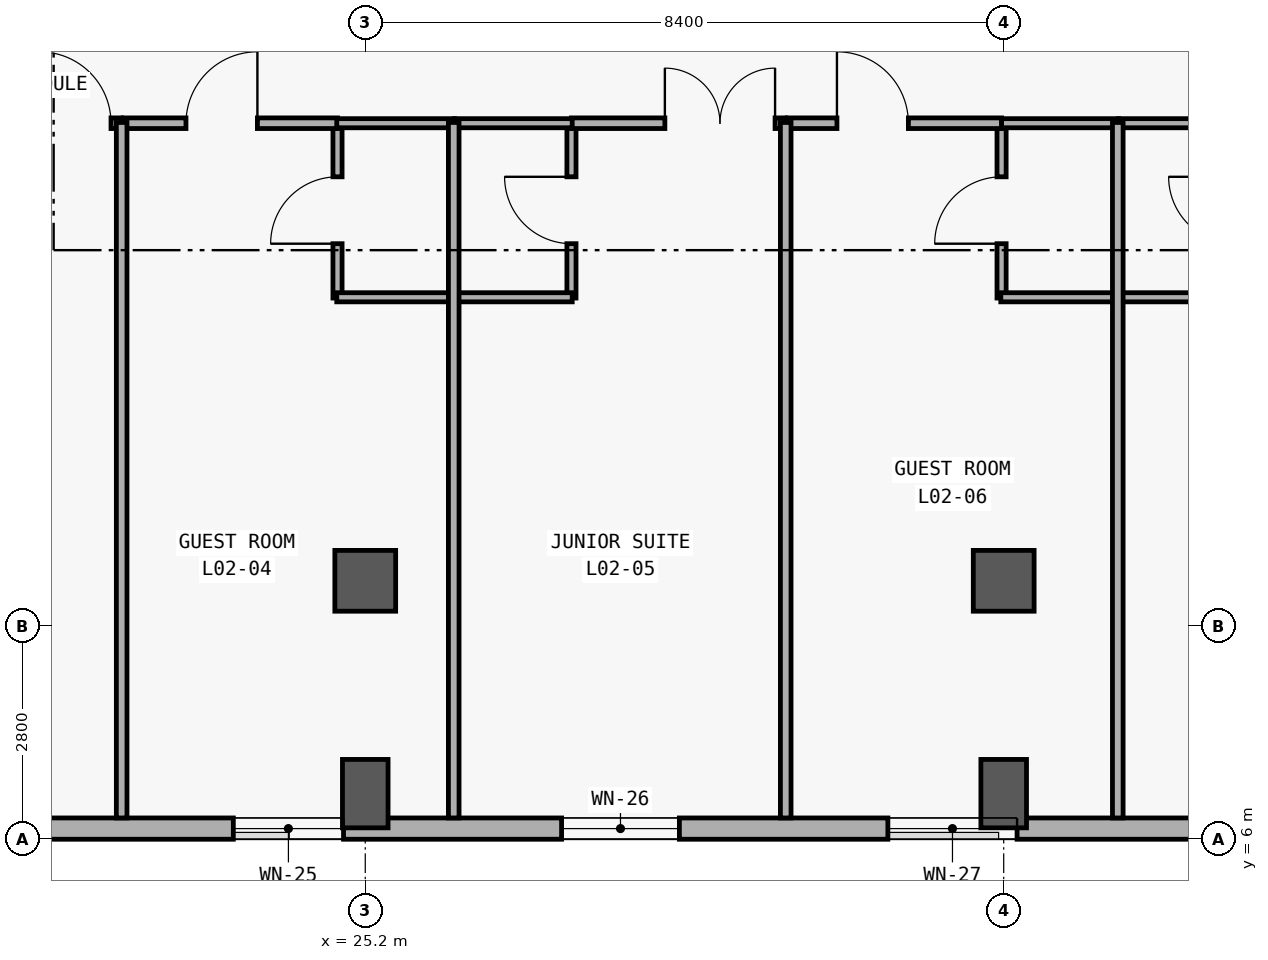
"""IFC4 building model, lengths in metres.
Left out: names, types, materials, properties, quantities, classifications, styles, units other than length and angle.
Written with IfcOpenShell. Run it as: python <this file> out.ifc"""

import sys

from ifc_helpers import new_model, si_unit, direction, frame, frame_2d, origin, origin_2d, place, context, subcontext, project, spatial, rectangle, extrude, element, fill, save


model = new_model("IFC4")
c1 = context("Model", 3, precision=1e-05, world=origin(), true_north=direction((0.0, 1.0)))
c2 = subcontext(c1, "Body", "Model", "MODEL_VIEW")
j1 = project(units=[si_unit("LENGTHUNIT", "METRE"), si_unit("PLANEANGLEUNIT", "RADIAN")], contexts=[c1])
p1 = place(None, origin())
s1 = spatial("IfcSite", under=j1, at=p1, CompositionType="ELEMENT")
p2 = place(p1, origin())
s2 = spatial("IfcBuilding", under=s1, at=p2, CompositionType="ELEMENT")
p3 = place(p2, frame((0.0, 0.0, 10.8)))
s3 = spatial("IfcBuildingStorey", under=s2, at=p3, CompositionType="ELEMENT", Elevation=10.8)
p4 = place(p3, frame((25.2, 6.6, 0.0), z_axis=(0.0, 0.0, 1.0), x_axis=(0.0, 1.0, 0.0)))
e1 = element("IfcColumn", 1, at=p4, inside=s3, PredefinedType="COLUMN", context=c2, shape_type="SweptSolid", body=[
    extrude(rectangle(XDim=0.6, YDim=0.9, at=origin_2d()), origin(), (0.0, 0.0, 1.0), 4.2),
])
p5 = place(p3, frame((25.2, 9.4, 0.0), z_axis=(0.0, 0.0, 1.0), x_axis=(1.0, 0.0, 0.0)))
e2 = element("IfcColumn", 2, at=p5, inside=s3, PredefinedType="COLUMN", context=c2, shape_type="SweptSolid", body=[
    extrude(rectangle(XDim=0.8, YDim=0.8, at=origin_2d()), origin(), (0.0, 0.0, 1.0), 4.2),
])
p6 = place(p3, frame((33.6, 6.6, 0.0), z_axis=(0.0, 0.0, 1.0), x_axis=(0.0, 1.0, 0.0)))
e3 = element("IfcColumn", 3, at=p6, inside=s3, PredefinedType="COLUMN", context=c2, shape_type="SweptSolid", body=[
    extrude(rectangle(XDim=0.6, YDim=0.9, at=origin_2d()), origin(), (0.0, 0.0, 1.0), 4.2),
])
p7 = place(p3, frame((33.6, 9.4, 0.0), z_axis=(0.0, 0.0, 1.0), x_axis=(1.0, 0.0, 0.0)))
e4 = element("IfcColumn", 4, at=p7, inside=s3, PredefinedType="COLUMN", context=c2, shape_type="SweptSolid", body=[
    extrude(rectangle(XDim=0.8, YDim=0.8, at=origin_2d()), origin(), (0.0, 0.0, 1.0), 4.2),
])
p8 = place(p3, frame((92.12, 6.14, 0.0), z_axis=(0.0, 0.0, 1.0), x_axis=(-1.0, 0.0, 0.0)))
e5 = element("IfcWall", 5, at=p8, inside=s3, PredefinedType="SOLIDWALL", context=c2, shape_type="SweptSolid", body=[
    extrude(rectangle(XDim=83.44, YDim=0.28, at=frame_2d((41.72, 0.0))), origin(), (0.0, 0.0, 1.0), 3.92),
])
p9 = place(p8, frame((79.486, 0.0, 0.85)))
e6 = element("IfcOpeningElement", 6, at=p9, cuts=e5, PredefinedType="OPENING", context=c2, shape_type="SweptSolid", body=[
    extrude(rectangle(XDim=3.1, YDim=2.2, at=frame_2d((1.55, 1.1))), frame((0.0, 0.15, 0.0), z_axis=(0.0, -1.0, 0.0), x_axis=(1.0, 0.0, 0.0)), (0.0, 0.0, 1.0), 0.3),
])
p10 = place(p8, frame((76.043, 0.0, 0.85)))
e7 = element("IfcOpeningElement", 7, at=p10, cuts=e5, PredefinedType="OPENING", context=c2, shape_type="SweptSolid", body=[
    extrude(rectangle(XDim=1.25, YDim=1.45, at=frame_2d((0.625, 0.725))), frame((0.0, 0.15, 0.0), z_axis=(0.0, -1.0, 0.0), x_axis=(1.0, 0.0, 0.0)), (0.0, 0.0, 1.0), 0.3),
])
p11 = place(p8, frame((71.624, 0.0, 0.85)))
e8 = element("IfcOpeningElement", 8, at=p11, cuts=e5, PredefinedType="OPENING", context=c2, shape_type="SweptSolid", body=[
    extrude(rectangle(XDim=1.35, YDim=1.55, at=frame_2d((0.675, 0.775))), frame((0.0, 0.15, 0.0), z_axis=(0.0, -1.0, 0.0), x_axis=(1.0, 0.0, 0.0)), (0.0, 0.0, 1.0), 0.3),
])
p12 = place(p8, frame((67.206, 0.0, 0.85)))
e9 = element("IfcOpeningElement", 9, at=p12, cuts=e5, PredefinedType="OPENING", context=c2, shape_type="SweptSolid", body=[
    extrude(rectangle(XDim=1.45, YDim=1.65, at=frame_2d((0.725, 0.825))), frame((0.0, 0.15, 0.0), z_axis=(0.0, -1.0, 0.0), x_axis=(1.0, 0.0, 0.0)), (0.0, 0.0, 1.0), 0.3),
])
p13 = place(p8, frame((62.787, 0.0, 0.85)))
e10 = element("IfcOpeningElement", 10, at=p13, cuts=e5, PredefinedType="OPENING", context=c2, shape_type="SweptSolid", body=[
    extrude(rectangle(XDim=1.55, YDim=1.65, at=frame_2d((0.775, 0.825))), frame((0.0, 0.15, 0.0), z_axis=(0.0, -1.0, 0.0), x_axis=(1.0, 0.0, 0.0)), (0.0, 0.0, 1.0), 0.3),
])
p14 = place(p8, frame((58.344, 0.0, 0.85)))
e11 = element("IfcOpeningElement", 11, at=p14, cuts=e5, PredefinedType="OPENING", context=c2, shape_type="SweptSolid", body=[
    extrude(rectangle(XDim=1.7, YDim=2.0, at=frame_2d((0.85, 1.0))), frame((0.0, 0.15, 0.0), z_axis=(0.0, -1.0, 0.0), x_axis=(1.0, 0.0, 0.0)), (0.0, 0.0, 1.0), 0.3),
])
p15 = place(p8, frame((53.675, 0.0, 0.85)))
e12 = element("IfcOpeningElement", 12, at=p15, cuts=e5, PredefinedType="OPENING", context=c2, shape_type="SweptSolid", body=[
    extrude(rectangle(XDim=2.3, YDim=2.05, at=frame_2d((1.15, 1.025))), frame((0.0, 0.15, 0.0), z_axis=(0.0, -1.0, 0.0), x_axis=(1.0, 0.0, 0.0)), (0.0, 0.0, 1.0), 0.3),
])
p16 = place(p8, frame((49.082, 0.0, 0.85)))
e13 = element("IfcOpeningElement", 13, at=p16, cuts=e5, PredefinedType="OPENING", context=c2, shape_type="SweptSolid", body=[
    extrude(rectangle(XDim=2.75, YDim=2.1, at=frame_2d((1.375, 1.05))), frame((0.0, 0.15, 0.0), z_axis=(0.0, -1.0, 0.0), x_axis=(1.0, 0.0, 0.0)), (0.0, 0.0, 1.0), 0.3),
])
p17 = place(p8, frame((44.439, 0.0, 0.85)))
e14 = element("IfcOpeningElement", 14, at=p17, cuts=e5, PredefinedType="OPENING", context=c2, shape_type="SweptSolid", body=[
    extrude(rectangle(XDim=3.3, YDim=2.15, at=frame_2d((1.65, 1.075))), frame((0.0, 0.15, 0.0), z_axis=(0.0, -1.0, 0.0), x_axis=(1.0, 0.0, 0.0)), (0.0, 0.0, 1.0), 0.3),
])
p18 = place(p8, frame((41.13, 0.0, 0.85)))
e15 = element("IfcOpeningElement", 15, at=p18, cuts=e5, PredefinedType="OPENING", context=c2, shape_type="SweptSolid", body=[
    extrude(rectangle(XDim=1.18, YDim=1.5, at=frame_2d((0.59, 0.75))), frame((0.0, 0.15, 0.0), z_axis=(0.0, -1.0, 0.0), x_axis=(1.0, 0.0, 0.0)), (0.0, 0.0, 1.0), 0.3),
])
p19 = place(p8, frame((36.712, 0.0, 0.85)))
e16 = element("IfcOpeningElement", 16, at=p19, cuts=e5, PredefinedType="OPENING", context=c2, shape_type="SweptSolid", body=[
    extrude(rectangle(XDim=1.28, YDim=1.6, at=frame_2d((0.64, 0.8))), frame((0.0, 0.15, 0.0), z_axis=(0.0, -1.0, 0.0), x_axis=(1.0, 0.0, 0.0)), (0.0, 0.0, 1.0), 0.3),
])
p20 = place(p8, frame((32.293, 0.0, 0.85)))
e17 = element("IfcOpeningElement", 17, at=p20, cuts=e5, PredefinedType="OPENING", context=c2, shape_type="SweptSolid", body=[
    extrude(rectangle(XDim=1.38, YDim=1.7, at=frame_2d((0.69, 0.85))), frame((0.0, 0.15, 0.0), z_axis=(0.0, -1.0, 0.0), x_axis=(1.0, 0.0, 0.0)), (0.0, 0.0, 1.0), 0.3),
])
p21 = place(p8, frame((27.875, 0.0, 0.85)))
e18 = element("IfcOpeningElement", 18, at=p21, cuts=e5, PredefinedType="OPENING", context=c2, shape_type="SweptSolid", body=[
    extrude(rectangle(XDim=1.48, YDim=1.8, at=frame_2d((0.74, 0.9))), frame((0.0, 0.15, 0.0), z_axis=(0.0, -1.0, 0.0), x_axis=(1.0, 0.0, 0.0)), (0.0, 0.0, 1.0), 0.3),
])
p22 = place(p8, frame((23.456, 0.0, 0.85)))
e19 = element("IfcOpeningElement", 19, at=p22, cuts=e5, PredefinedType="OPENING", context=c2, shape_type="SweptSolid", body=[
    extrude(rectangle(XDim=1.58, YDim=1.85, at=frame_2d((0.79, 0.925))), frame((0.0, 0.15, 0.0), z_axis=(0.0, -1.0, 0.0), x_axis=(1.0, 0.0, 0.0)), (0.0, 0.0, 1.0), 0.3),
])
p23 = place(p8, frame((19.038, 0.0, 0.85)))
e20 = element("IfcOpeningElement", 20, at=p23, cuts=e5, PredefinedType="OPENING", context=c2, shape_type="SweptSolid", body=[
    extrude(rectangle(XDim=1.68, YDim=1.9, at=frame_2d((0.84, 0.95))), frame((0.0, 0.15, 0.0), z_axis=(0.0, -1.0, 0.0), x_axis=(1.0, 0.0, 0.0)), (0.0, 0.0, 1.0), 0.3),
])
p24 = place(p8, frame((14.62, 0.0, 0.85)))
e21 = element("IfcOpeningElement", 21, at=p24, cuts=e5, PredefinedType="OPENING", context=c2, shape_type="SweptSolid", body=[
    extrude(rectangle(XDim=1.78, YDim=1.95, at=frame_2d((0.89, 0.975))), frame((0.0, 0.15, 0.0), z_axis=(0.0, -1.0, 0.0), x_axis=(1.0, 0.0, 0.0)), (0.0, 0.0, 1.0), 0.3),
])
p25 = place(p8, frame((10.201, 0.0, 0.85)))
e22 = element("IfcOpeningElement", 22, at=p25, cuts=e5, PredefinedType="OPENING", context=c2, shape_type="SweptSolid", body=[
    extrude(rectangle(XDim=1.88, YDim=1.95, at=frame_2d((0.94, 0.975))), frame((0.0, 0.15, 0.0), z_axis=(0.0, -1.0, 0.0), x_axis=(1.0, 0.0, 0.0)), (0.0, 0.0, 1.0), 0.3),
])
p26 = place(p8, frame((5.748, 0.0, 0.85)))
e23 = element("IfcOpeningElement", 23, at=p26, cuts=e5, PredefinedType="OPENING", context=c2, shape_type="SweptSolid", body=[
    extrude(rectangle(XDim=2.05, YDim=1.95, at=frame_2d((1.025, 0.975))), frame((0.0, 0.15, 0.0), z_axis=(0.0, -1.0, 0.0), x_axis=(1.0, 0.0, 0.0)), (0.0, 0.0, 1.0), 0.3),
])
p27 = place(p8, frame((1.314, 0.0, 0.85)))
e24 = element("IfcOpeningElement", 24, at=p27, cuts=e5, PredefinedType="OPENING", context=c2, shape_type="SweptSolid", body=[
    extrude(rectangle(XDim=2.18, YDim=1.95, at=frame_2d((1.09, 0.975))), frame((0.0, 0.15, 0.0), z_axis=(0.0, -1.0, 0.0), x_axis=(1.0, 0.0, 0.0)), (0.0, 0.0, 1.0), 0.3),
])
p28 = place(p3, frame((24.835, 13.12, 0.0), z_axis=(0.0, 0.0, 1.0), x_axis=(0.0, 1.0, 0.0)))
e25 = element("IfcWall", 25, at=p28, inside=s3, PredefinedType="PARTITIONING", context=c2, shape_type="SweptSolid", body=[
    extrude(rectangle(XDim=2.31, YDim=0.12, at=frame_2d((1.155, 0.0))), origin(), (0.0, 0.0, 1.0), 3.02),
])
p29 = place(p28, frame((0.715, 0.0, 0.0)))
e26 = element("IfcOpeningElement", 26, at=p29, cuts=e25, PredefinedType="OPENING", context=c2, shape_type="SweptSolid", body=[
    extrude(rectangle(XDim=0.88, YDim=2.15, at=frame_2d((0.44, 1.075))), frame((0.0, 0.07, 0.0), z_axis=(0.0, -1.0, 0.0), x_axis=(1.0, 0.0, 0.0)), (0.0, 0.0, 1.0), 0.14),
])
p30 = place(p3, frame((27.913, 13.12, 0.0), z_axis=(0.0, 0.0, 1.0), x_axis=(0.0, 1.0, 0.0)))
e27 = element("IfcWall", 27, at=p30, inside=s3, PredefinedType="PARTITIONING", context=c2, shape_type="SweptSolid", body=[
    extrude(rectangle(XDim=2.31, YDim=0.12, at=frame_2d((1.155, 0.0))), origin(), (0.0, 0.0, 1.0), 3.02),
])
p31 = place(p30, frame((0.715, 0.0, 0.0)))
e28 = element("IfcOpeningElement", 28, at=p31, cuts=e27, PredefinedType="OPENING", context=c2, shape_type="SweptSolid", body=[
    extrude(rectangle(XDim=0.88, YDim=2.15, at=frame_2d((0.44, 1.075))), frame((0.0, 0.07, 0.0), z_axis=(0.0, -1.0, 0.0), x_axis=(1.0, 0.0, 0.0)), (0.0, 0.0, 1.0), 0.14),
])
p32 = place(p3, frame((33.572, 13.12, 0.0), z_axis=(0.0, 0.0, 1.0), x_axis=(0.0, 1.0, 0.0)))
e29 = element("IfcWall", 29, at=p32, inside=s3, PredefinedType="PARTITIONING", context=c2, shape_type="SweptSolid", body=[
    extrude(rectangle(XDim=2.31, YDim=0.12, at=frame_2d((1.155, 0.0))), origin(), (0.0, 0.0, 1.0), 3.02),
])
p33 = place(p32, frame((0.715, 0.0, 0.0)))
e30 = element("IfcOpeningElement", 30, at=p33, cuts=e29, PredefinedType="OPENING", context=c2, shape_type="SweptSolid", body=[
    extrude(rectangle(XDim=0.88, YDim=2.15, at=frame_2d((0.44, 1.075))), frame((0.0, 0.07, 0.0), z_axis=(0.0, -1.0, 0.0), x_axis=(1.0, 0.0, 0.0)), (0.0, 0.0, 1.0), 0.14),
])
p34 = place(p3, frame((19.176, 15.42, 0.0), z_axis=(0.0, 0.0, 1.0), x_axis=(1.0, 0.0, 0.0)))
e31 = element("IfcWall", 31, at=p34, inside=s3, PredefinedType="PARTITIONING", context=c2, shape_type="SweptSolid", body=[
    extrude(rectangle(XDim=2.819, YDim=0.14, at=frame_2d((1.41, 0.0))), origin(), (0.0, 0.0, 1.0), 3.02),
])
p35 = place(p34, frame((1.739, 0.0, 0.0)))
e32 = element("IfcOpeningElement", 32, at=p35, cuts=e31, PredefinedType="OPENING", context=c2, shape_type="SweptSolid", body=[
    extrude(rectangle(XDim=0.94, YDim=2.2, at=frame_2d((0.47, 1.1))), frame((0.0, 0.08, 0.0), z_axis=(0.0, -1.0, 0.0), x_axis=(1.0, 0.0, 0.0)), (0.0, 0.0, 1.0), 0.16),
])
p36 = place(p3, frame((22.015, 15.42, 0.0), z_axis=(0.0, 0.0, 1.0), x_axis=(1.0, 0.0, 0.0)))
e33 = element("IfcWall", 33, at=p36, inside=s3, PredefinedType="PARTITIONING", context=c2, shape_type="SweptSolid", body=[
    extrude(rectangle(XDim=2.82, YDim=0.14, at=frame_2d((1.41, 0.0))), origin(), (0.0, 0.0, 1.0), 3.02),
])
p37 = place(p36, frame((0.826, 0.0, 0.0)))
e34 = element("IfcOpeningElement", 34, at=p37, cuts=e33, PredefinedType="OPENING", context=c2, shape_type="SweptSolid", body=[
    extrude(rectangle(XDim=0.94, YDim=2.2, at=frame_2d((0.47, 1.1))), frame((0.0, 0.08, 0.0), z_axis=(0.0, -1.0, 0.0), x_axis=(1.0, 0.0, 0.0)), (0.0, 0.0, 1.0), 0.16),
])
p38 = place(p3, frame((27.913, 15.42, 0.0), z_axis=(0.0, 0.0, 1.0), x_axis=(1.0, 0.0, 0.0)))
e35 = element("IfcWall", 35, at=p38, inside=s3, PredefinedType="PARTITIONING", context=c2, shape_type="SweptSolid", body=[
    extrude(rectangle(XDim=2.819, YDim=0.14, at=frame_2d((1.409, 0.0))), origin(), (0.0, 0.0, 1.0), 3.02),
])
p39 = place(p38, frame((1.229, 0.0, 0.0)))
e36 = element("IfcOpeningElement", 36, at=p39, cuts=e35, PredefinedType="OPENING", context=c2, shape_type="SweptSolid", body=[
    extrude(rectangle(XDim=1.45, YDim=2.3, at=frame_2d((0.725, 1.15))), frame((0.0, 0.08, 0.0), z_axis=(0.0, -1.0, 0.0), x_axis=(1.0, 0.0, 0.0)), (0.0, 0.0, 1.0), 0.16),
])
p40 = place(p3, frame((30.752, 15.42, 0.0), z_axis=(0.0, 0.0, 1.0), x_axis=(1.0, 0.0, 0.0)))
e37 = element("IfcWall", 37, at=p40, inside=s3, PredefinedType="PARTITIONING", context=c2, shape_type="SweptSolid", body=[
    extrude(rectangle(XDim=2.82, YDim=0.14, at=frame_2d((1.41, 0.0))), origin(), (0.0, 0.0, 1.0), 3.02),
])
p41 = place(p40, frame((0.654, 0.0, 0.0)))
e38 = element("IfcOpeningElement", 38, at=p41, cuts=e37, PredefinedType="OPENING", context=c2, shape_type="SweptSolid", body=[
    extrude(rectangle(XDim=0.94, YDim=2.2, at=frame_2d((0.47, 1.1))), frame((0.0, 0.08, 0.0), z_axis=(0.0, -1.0, 0.0), x_axis=(1.0, 0.0, 0.0)), (0.0, 0.0, 1.0), 0.16),
])
for number, where, z_axis, x_axis in (
    (39, (24.825, 13.13, 0.0), (0.0, 0.0, 1.0), (1.0, 0.0, 0.0)),
    (40, (24.825, 15.42, 0.0), (0.0, 0.0, 1.0), (1.0, 0.0, 0.0)),
    (41, (26.374, 13.13, 0.0), (0.0, 0.0, 1.0), (1.0, 0.0, 0.0)),
    (42, (26.374, 15.42, 0.0), (0.0, 0.0, 1.0), (1.0, 0.0, 0.0)),
    (43, (33.562, 13.13, 0.0), (0.0, 0.0, 1.0), (1.0, 0.0, 0.0)),
):
    element("IfcWall", number, at=place(p3, frame(where, z_axis=z_axis, x_axis=x_axis)), inside=s3, PredefinedType="PARTITIONING", context=c2, shape_type="SweptSolid", body=[
        extrude(rectangle(XDim=1.549, YDim=0.12, at=frame_2d((0.774, 0.0))), origin(), (0.0, 0.0, 1.0), 3.02),
    ])
p42 = place(p3, frame((33.572, 15.42, 0.0), z_axis=(0.0, 0.0, 1.0), x_axis=(1.0, 0.0, 0.0)))
e44 = element("IfcWall", 44, at=p42, inside=s3, PredefinedType="PARTITIONING", context=c2, shape_type="SweptSolid", body=[
    extrude(rectangle(XDim=1.539, YDim=0.12, at=frame_2d((0.77, 0.0))), origin(), (0.0, 0.0, 1.0), 3.02),
])
for number, where, z_axis, x_axis in (
    (45, (35.111, 13.13, 0.0), (0.0, 0.0, 1.0), (1.0, 0.0, 0.0)),
    (46, (35.111, 15.42, 0.0), (0.0, 0.0, 1.0), (1.0, 0.0, 0.0)),
):
    element("IfcWall", number, at=place(p3, frame(where, z_axis=z_axis, x_axis=x_axis)), inside=s3, PredefinedType="PARTITIONING", context=c2, shape_type="SweptSolid", body=[
        extrude(rectangle(XDim=1.549, YDim=0.12, at=frame_2d((0.774, 0.0))), origin(), (0.0, 0.0, 1.0), 3.02),
    ])
for number, where, z_axis, x_axis in (
    (47, (21.995, 6.28, 0.0), (0.0, 0.0, 1.0), (0.0, 1.0, 0.0)),
    (48, (26.364, 6.28, 0.0), (0.0, 0.0, 1.0), (0.0, 1.0, 0.0)),
    (49, (30.732, 6.28, 0.0), (0.0, 0.0, 1.0), (0.0, 1.0, 0.0)),
    (50, (35.101, 6.28, 0.0), (0.0, 0.0, 1.0), (0.0, 1.0, 0.0)),
):
    element("IfcWall", number, at=place(p3, frame(where, z_axis=z_axis, x_axis=x_axis)), inside=s3, PredefinedType="PARTITIONING", context=c2, shape_type="SweptSolid", body=[
        extrude(rectangle(XDim=9.15, YDim=0.14, at=frame_2d((4.575, 0.0))), origin(), (0.0, 0.0, 1.0), 3.02),
    ])
p43 = place(p12, origin())
e51 = element("IfcWindow", 51, at=p43, inside=s3, PartitioningType="SINGLE_PANEL", PredefinedType="WINDOW", context=c2, shape_type="SweptSolid", body=[
    extrude(rectangle(XDim=1.45, YDim=1.65, at=frame_2d((0.725, 0.825))), frame((0.0, 0.03, 0.0), z_axis=(0.0, -1.0, 0.0), x_axis=(1.0, 0.0, 0.0)), (0.0, 0.0, 1.0), 0.06),
])
fill(e9, e51)
p44 = place(p13, origin())
e52 = element("IfcWindow", 52, at=p44, inside=s3, PartitioningType="SINGLE_PANEL", PredefinedType="WINDOW", context=c2, shape_type="SweptSolid", body=[
    extrude(rectangle(XDim=1.55, YDim=1.65, at=frame_2d((0.775, 0.825))), frame((0.0, 0.03, 0.0), z_axis=(0.0, -1.0, 0.0), x_axis=(1.0, 0.0, 0.0)), (0.0, 0.0, 1.0), 0.06),
])
fill(e10, e52)
p45 = place(p14, origin())
e53 = element("IfcWindow", 53, at=p45, inside=s3, PartitioningType="SINGLE_PANEL", PredefinedType="WINDOW", context=c2, shape_type="SweptSolid", body=[
    extrude(rectangle(XDim=1.7, YDim=2.0, at=frame_2d((0.85, 1.0))), frame((0.0, 0.03, 0.0), z_axis=(0.0, -1.0, 0.0), x_axis=(1.0, 0.0, 0.0)), (0.0, 0.0, 1.0), 0.06),
])
fill(e11, e53)
p46 = place(p29, origin())
e54 = element("IfcDoor", 54, at=p46, inside=s3, OperationType="SINGLE_SWING_LEFT", PredefinedType="DOOR", context=c2, shape_type="SweptSolid", body=[
    extrude(rectangle(XDim=0.88, YDim=2.15, at=frame_2d((0.44, 1.075))), frame((0.0, 0.025, 0.0), z_axis=(0.0, -1.0, 0.0), x_axis=(1.0, 0.0, 0.0)), (0.0, 0.0, 1.0), 0.05),
])
fill(e26, e54)
p47 = place(p31, origin())
e55 = element("IfcDoor", 55, at=p47, inside=s3, OperationType="SINGLE_SWING_RIGHT", PredefinedType="DOOR", context=c2, shape_type="SweptSolid", body=[
    extrude(rectangle(XDim=0.88, YDim=2.15, at=frame_2d((0.44, 1.075))), frame((0.0, 0.025, 0.0), z_axis=(0.0, -1.0, 0.0), x_axis=(1.0, 0.0, 0.0)), (0.0, 0.0, 1.0), 0.05),
])
fill(e28, e55)
p48 = place(p33, origin())
e56 = element("IfcDoor", 56, at=p48, inside=s3, OperationType="SINGLE_SWING_LEFT", PredefinedType="DOOR", context=c2, shape_type="SweptSolid", body=[
    extrude(rectangle(XDim=0.88, YDim=2.15, at=frame_2d((0.44, 1.075))), frame((0.0, 0.025, 0.0), z_axis=(0.0, -1.0, 0.0), x_axis=(1.0, 0.0, 0.0)), (0.0, 0.0, 1.0), 0.05),
])
fill(e30, e56)
p49 = place(p35, origin())
e57 = element("IfcDoor", 57, at=p49, inside=s3, OperationType="SINGLE_SWING_LEFT", PredefinedType="DOOR", context=c2, shape_type="SweptSolid", body=[
    extrude(rectangle(XDim=0.94, YDim=2.2, at=frame_2d((0.47, 1.1))), frame((0.0, 0.025, 0.0), z_axis=(0.0, -1.0, 0.0), x_axis=(1.0, 0.0, 0.0)), (0.0, 0.0, 1.0), 0.05),
])
fill(e32, e57)
p50 = place(p37, origin())
e58 = element("IfcDoor", 58, at=p50, inside=s3, OperationType="SINGLE_SWING_RIGHT", PredefinedType="DOOR", context=c2, shape_type="SweptSolid", body=[
    extrude(rectangle(XDim=0.94, YDim=2.2, at=frame_2d((0.47, 1.1))), frame((0.0, 0.025, 0.0), z_axis=(0.0, -1.0, 0.0), x_axis=(1.0, 0.0, 0.0)), (0.0, 0.0, 1.0), 0.05),
])
fill(e34, e58)
p51 = place(p39, origin())
e59 = element("IfcDoor", 59, at=p51, inside=s3, OperationType="DOUBLE_DOOR_SINGLE_SWING", PredefinedType="DOOR", context=c2, shape_type="SweptSolid", body=[
    extrude(rectangle(XDim=1.45, YDim=2.3, at=frame_2d((0.725, 1.15))), frame((0.0, 0.025, 0.0), z_axis=(0.0, -1.0, 0.0), x_axis=(1.0, 0.0, 0.0)), (0.0, 0.0, 1.0), 0.05),
])
fill(e36, e59)
p52 = place(p41, origin())
e60 = element("IfcDoor", 60, at=p52, inside=s3, OperationType="SINGLE_SWING_LEFT", PredefinedType="DOOR", context=c2, shape_type="SweptSolid", body=[
    extrude(rectangle(XDim=0.94, YDim=2.2, at=frame_2d((0.47, 1.1))), frame((0.0, 0.025, 0.0), z_axis=(0.0, -1.0, 0.0), x_axis=(1.0, 0.0, 0.0)), (0.0, 0.0, 1.0), 0.05),
])
fill(e38, e60)
save(model, sys.argv[1])
